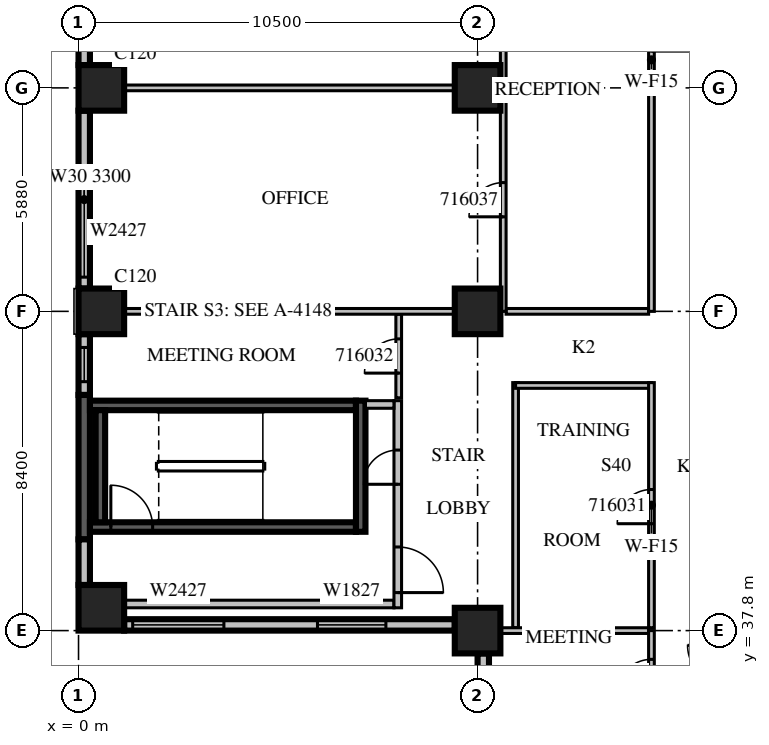
"""IFC4 building model, lengths in metres.
Left out: names, types, materials, properties, quantities, classifications, styles, units other than length and angle.
Written with IfcOpenShell. Run it as: python <this file> out.ifc"""

import sys

from ifc_helpers import new_model, si_unit, direction, frame, frame_2d, origin, origin_2d, place, context, subcontext, project, spatial, rectangle, extrude, source, transform, mapped, element, fill, save


model = new_model("IFC4")
c1 = context("Model", 3, precision=1e-05, world=origin(), true_north=direction((0.0, 1.0)))
c2 = subcontext(c1, "Body", "Model", "MODEL_VIEW")
j1 = project(units=[si_unit("LENGTHUNIT", "METRE"), si_unit("PLANEANGLEUNIT", "RADIAN")], contexts=[c1])
p1 = place(None, origin())
s1 = spatial("IfcSite", under=j1, at=p1, CompositionType="ELEMENT")
p2 = place(p1, origin())
s2 = spatial("IfcBuilding", under=s1, at=p2, CompositionType="ELEMENT")
p3 = place(p2, frame((0.0, 0.0, 78.3)))
s3 = spatial("IfcBuildingStorey", under=s2, at=p3, CompositionType="ELEMENT", Elevation=78.3)
m1 = source(origin(), c2, "Body", "SweptSolid", [
    extrude(rectangle(XDim=1.2, YDim=1.2, at=origin_2d()), origin(), (0.0, 0.0, 1.0), 4.2),
])
for number, where, z_axis, x_axis in (
    (1, (0.6, 38.4, 0.0), (0.0, 0.0, 1.0), (1.0, 0.0, 0.0)),
    (2, (10.5, 37.8, 0.0), (0.0, 0.0, 1.0), (1.0, 0.0, 0.0)),
    (3, (0.6, 46.2, 0.0), (0.0, 0.0, 1.0), (1.0, 0.0, 0.0)),
    (4, (10.5, 46.2, 0.0), (0.0, 0.0, 1.0), (1.0, 0.0, 0.0)),
    (5, (0.6, 52.08, 0.0), (0.0, 0.0, 1.0), (1.0, 0.0, 0.0)),
    (6, (10.5, 52.08, 0.0), (0.0, 0.0, 1.0), (1.0, 0.0, 0.0)),
):
    element("IfcColumn", number, at=place(p3, frame(where, z_axis=z_axis, x_axis=x_axis)), inside=s3, PredefinedType="COLUMN", context=c2, shape_type="MappedRepresentation", body=[
        mapped(m1, transform((0.0, 0.0, 0.0), scale=1.0)),
    ])
m2 = source(origin(), c2, "Body", "SweptSolid", [
    extrude(rectangle(XDim=0.88, YDim=0.3, at=frame_2d((0.44, 0.0))), origin(), (0.0, 0.0, 1.0), 3.8),
])
p4 = place(p3, frame((0.15, 53.56, 0.0), z_axis=(0.0, 0.0, 1.0), x_axis=(0.0, -1.0, 0.0)))
e7 = element("IfcWall", 7, at=p4, inside=s3, PredefinedType="STANDARD", context=c2, shape_type="MappedRepresentation", body=[
    mapped(m2, transform((0.0, 0.0, 0.0), scale=1.0)),
])
m3 = source(origin(), c2, "Body", "SweptSolid", [
    extrude(rectangle(XDim=4.68, YDim=0.3, at=frame_2d((2.34, 0.0))), origin(), (0.0, 0.0, 1.0), 3.3),
])
p5 = place(p3, frame((0.15, 51.48, 0.0), z_axis=(0.0, 0.0, 1.0), x_axis=(0.0, -1.0, 0.0)))
e8 = element("IfcWall", 8, at=p5, inside=s3, PredefinedType="STANDARD", context=c2, shape_type="MappedRepresentation", body=[
    mapped(m3, transform((0.0, 0.0, 0.0), scale=1.0)),
])
m4 = source(origin(), c2, "Body", "SweptSolid", [
    extrude(rectangle(XDim=2.4, YDim=2.7, at=frame_2d((1.2, 1.35))), frame((0.0, 0.16, 0.0), z_axis=(0.0, -1.0, 0.0), x_axis=(1.0, 0.0, 0.0)), (0.0, 0.0, 1.0), 0.32),
])
p6 = place(p5, frame((1.98, 0.0, 0.6)))
e9 = element("IfcOpeningElement", 9, at=p6, cuts=e8, PredefinedType="OPENING", context=c2, shape_type="MappedRepresentation", body=[
    mapped(m4, transform((0.0, 0.0, 0.0), scale=1.0)),
])
m5 = source(origin(), c2, "Body", "SweptSolid", [
    extrude(rectangle(XDim=1.6, YDim=0.3, at=frame_2d((0.8, 0.0))), origin(), (0.0, 0.0, 1.0), 3.8),
])
p7 = place(p3, frame((0.15, 45.6, 0.0), z_axis=(0.0, 0.0, 1.0), x_axis=(0.0, -1.0, 0.0)))
e10 = element("IfcWall", 10, at=p7, inside=s3, PredefinedType="STANDARD", context=c2, shape_type="MappedRepresentation", body=[
    mapped(m5, transform((0.0, 0.0, 0.0), scale=1.0)),
])
m6 = source(origin(), c2, "Body", "SweptSolid", [
    extrude(rectangle(XDim=0.9, YDim=2.7, at=frame_2d((0.45, 1.35))), frame((0.0, 0.16, 0.0), z_axis=(0.0, -1.0, 0.0), x_axis=(1.0, 0.0, 0.0)), (0.0, 0.0, 1.0), 0.32),
])
p8 = place(p7, frame((0.35, 0.0, 0.6)))
e11 = element("IfcOpeningElement", 11, at=p8, cuts=e10, PredefinedType="OPENING", context=c2, shape_type="MappedRepresentation", body=[
    mapped(m6, transform((0.0, 0.0, 0.0), scale=1.0)),
])
m7 = source(origin(), c2, "Body", "SweptSolid", [
    extrude(rectangle(XDim=3.8, YDim=0.3, at=frame_2d((1.9, 0.0))), origin(), (0.0, 0.0, 1.0), 3.8),
])
p9 = place(p3, frame((0.15, 44.0, 0.0), z_axis=(0.0, 0.0, 1.0), x_axis=(0.0, -1.0, 0.0)))
e12 = element("IfcWall", 12, at=p9, inside=s3, PredefinedType="SOLIDWALL", context=c2, shape_type="MappedRepresentation", body=[
    mapped(m7, transform((0.0, 0.0, 0.0), scale=1.0)),
])
m8 = source(origin(), c2, "Body", "SweptSolid", [
    extrude(rectangle(XDim=1.2, YDim=0.3, at=frame_2d((0.6, 0.0))), origin(), (0.0, 0.0, 1.0), 3.8),
])
p10 = place(p3, frame((0.15, 40.2, 0.0), z_axis=(0.0, 0.0, 1.0), x_axis=(0.0, -1.0, 0.0)))
e13 = element("IfcWall", 13, at=p10, inside=s3, PredefinedType="STANDARD", context=c2, shape_type="MappedRepresentation", body=[
    mapped(m8, transform((0.0, 0.0, 0.0), scale=1.0)),
])
m9 = source(origin(), c2, "Body", "SweptSolid", [
    extrude(rectangle(XDim=8.7, YDim=0.3, at=frame_2d((4.35, 0.0))), origin(), (0.0, 0.0, 1.0), 3.8),
])
p11 = place(p3, frame((1.2, 37.95, 0.0), z_axis=(0.0, 0.0, 1.0), x_axis=(1.0, 0.0, 0.0)))
e14 = element("IfcWall", 14, at=p11, inside=s3, PredefinedType="STANDARD", context=c2, shape_type="MappedRepresentation", body=[
    mapped(m9, transform((0.0, 0.0, 0.0), scale=1.0)),
])
p12 = place(p11, frame((0.225, 0.0, 0.6)))
e15 = element("IfcOpeningElement", 15, at=p12, cuts=e14, PredefinedType="OPENING", context=c2, shape_type="MappedRepresentation", body=[
    mapped(m4, transform((0.0, 0.0, 0.0), scale=1.0)),
])
m10 = source(origin(), c2, "Body", "SweptSolid", [
    extrude(rectangle(XDim=1.8, YDim=2.7, at=frame_2d((0.9, 1.35))), frame((0.0, 0.16, 0.0), z_axis=(0.0, -1.0, 0.0), x_axis=(1.0, 0.0, 0.0)), (0.0, 0.0, 1.0), 0.32),
])
p13 = place(p11, frame((5.088, 0.0, 0.6)))
e16 = element("IfcOpeningElement", 16, at=p13, cuts=e14, PredefinedType="OPENING", context=c2, shape_type="MappedRepresentation", body=[
    mapped(m10, transform((0.0, 0.0, 0.0), scale=1.0)),
])
m11 = source(origin(), c2, "Body", "SweptSolid", [
    extrude(rectangle(XDim=7.2, YDim=0.3, at=frame_2d((3.6, 0.0))), origin(), (0.0, 0.0, 1.0), 3.8),
])
p14 = place(p3, frame((10.65, 37.2, 0.0), z_axis=(0.0, 0.0, 1.0), x_axis=(0.0, -1.0, 0.0)))
e17 = element("IfcWall", 17, at=p14, inside=s3, PredefinedType="STANDARD", context=c2, shape_type="MappedRepresentation", body=[
    mapped(m11, transform((0.0, 0.0, 0.0), scale=1.0)),
])
m12 = source(origin(), c2, "Body", "SweptSolid", [
    extrude(rectangle(XDim=1.2, YDim=2.7, at=frame_2d((0.6, 1.35))), frame((0.0, 0.16, 0.0), z_axis=(0.0, -1.0, 0.0), x_axis=(1.0, 0.0, 0.0)), (0.0, 0.0, 1.0), 0.32),
])
p15 = place(p14, frame((4.942, 0.0, 0.6)))
e18 = element("IfcOpeningElement", 18, at=p15, cuts=e17, PredefinedType="OPENING", context=c2, shape_type="MappedRepresentation", body=[
    mapped(m12, transform((0.0, 0.0, 0.0), scale=1.0)),
])
p16 = place(p14, frame((2.229, 0.0, 0.6)))
e19 = element("IfcOpeningElement", 19, at=p16, cuts=e17, PredefinedType="OPENING", context=c2, shape_type="MappedRepresentation", body=[
    mapped(m12, transform((0.0, 0.0, 0.0), scale=1.0)),
])
m13 = source(origin(), c2, "Body", "SweptSolid", [
    extrude(rectangle(XDim=7.0, YDim=0.25, at=frame_2d((3.5, 0.0))), origin(), (0.0, 0.0, 1.0), 3.8),
])
p17 = place(p3, frame((0.3, 40.525, 0.0), z_axis=(0.0, 0.0, 1.0), x_axis=(1.0, 0.0, 0.0)))
e20 = element("IfcWall", 20, at=p17, inside=s3, PredefinedType="SOLIDWALL", context=c2, shape_type="MappedRepresentation", body=[
    mapped(m13, transform((0.0, 0.0, 0.0), scale=1.0)),
])
m14 = source(origin(), c2, "Body", "SweptSolid", [
    extrude(rectangle(XDim=1.1, YDim=2.1, at=frame_2d((0.55, 1.05))), frame((0.0, 0.135, 0.0), z_axis=(0.0, -1.0, 0.0), x_axis=(1.0, 0.0, 0.0)), (0.0, 0.0, 1.0), 0.27),
])
p18 = place(p17, frame((0.55, 0.0, 0.0)))
e21 = element("IfcOpeningElement", 21, at=p18, cuts=e20, PredefinedType="OPENING", context=c2, shape_type="MappedRepresentation", body=[
    mapped(m14, transform((0.0, 0.0, 0.0), scale=1.0)),
])
p19 = place(p3, frame((0.3, 43.725, 0.0), z_axis=(0.0, 0.0, 1.0), x_axis=(1.0, 0.0, 0.0)))
e22 = element("IfcWall", 22, at=p19, inside=s3, PredefinedType="SOLIDWALL", context=c2, shape_type="MappedRepresentation", body=[
    mapped(m13, transform((0.0, 0.0, 0.0), scale=1.0)),
])
m15 = source(origin(), c2, "Body", "SweptSolid", [
    extrude(rectangle(XDim=3.45, YDim=0.25, at=frame_2d((1.725, 0.0))), origin(), (0.0, 0.0, 1.0), 3.8),
])
p20 = place(p3, frame((7.425, 40.4, 0.0), z_axis=(0.0, 0.0, 1.0), x_axis=(0.0, 1.0, 0.0)))
e23 = element("IfcWall", 23, at=p20, inside=s3, PredefinedType="SOLIDWALL", context=c2, shape_type="MappedRepresentation", body=[
    mapped(m15, transform((0.0, 0.0, 0.0), scale=1.0)),
])
m16 = source(origin(), c2, "Body", "SweptSolid", [
    extrude(rectangle(XDim=2.95, YDim=0.25, at=frame_2d((1.475, 0.0))), origin(), (0.0, 0.0, 1.0), 3.8),
])
p21 = place(p3, frame((0.575, 40.65, 0.0), z_axis=(0.0, 0.0, 1.0), x_axis=(0.0, 1.0, 0.0)))
e24 = element("IfcWall", 24, at=p21, inside=s3, PredefinedType="SOLIDWALL", context=c2, shape_type="MappedRepresentation", body=[
    mapped(m16, transform((0.0, 0.0, 0.0), scale=1.0)),
])
m17 = source(origin(), c2, "Body", "SweptSolid", [
    extrude(rectangle(XDim=8.0, YDim=0.2, at=frame_2d((4.0, 0.0))), origin(), (0.0, 0.0, 1.0), 3.8),
])
p22 = place(p3, frame((0.3, 38.5, 0.0), z_axis=(0.0, 0.0, 1.0), x_axis=(1.0, 0.0, 0.0)))
e25 = element("IfcWall", 25, at=p22, inside=s3, PredefinedType="PARTITIONING", context=c2, shape_type="MappedRepresentation", body=[
    mapped(m17, transform((0.0, 0.0, 0.0), scale=1.0)),
])
m18 = source(origin(), c2, "Body", "SweptSolid", [
    extrude(rectangle(XDim=5.45, YDim=0.2, at=frame_2d((2.725, 0.0))), origin(), (0.0, 0.0, 1.0), 3.8),
])
p23 = place(p3, frame((8.4, 38.4, 0.0), z_axis=(0.0, 0.0, 1.0), x_axis=(0.0, 1.0, 0.0)))
e26 = element("IfcWall", 26, at=p23, inside=s3, PredefinedType="PARTITIONING", context=c2, shape_type="MappedRepresentation", body=[
    mapped(m18, transform((0.0, 0.0, 0.0), scale=1.0)),
])
m19 = source(origin(), c2, "Body", "SweptSolid", [
    extrude(rectangle(XDim=1.2, YDim=2.1, at=frame_2d((0.6, 1.05))), frame((0.0, 0.11, 0.0), z_axis=(0.0, -1.0, 0.0), x_axis=(1.0, 0.0, 0.0)), (0.0, 0.0, 1.0), 0.22),
])
p24 = place(p23, frame((0.4, 0.0, 0.0)))
e27 = element("IfcOpeningElement", 27, at=p24, cuts=e26, PredefinedType="OPENING", context=c2, shape_type="MappedRepresentation", body=[
    mapped(m19, transform((0.0, 0.0, 0.0), scale=1.0)),
])
m20 = source(origin(), c2, "Body", "SweptSolid", [
    extrude(rectangle(XDim=0.9, YDim=2.1, at=frame_2d((0.45, 1.05))), frame((0.0, 0.11, 0.0), z_axis=(0.0, -1.0, 0.0), x_axis=(1.0, 0.0, 0.0)), (0.0, 0.0, 1.0), 0.22),
])
p25 = place(p23, frame((3.25, 0.0, 0.0)))
e28 = element("IfcOpeningElement", 28, at=p25, cuts=e26, PredefinedType="OPENING", context=c2, shape_type="MappedRepresentation", body=[
    mapped(m20, transform((0.0, 0.0, 0.0), scale=1.0)),
])
m21 = source(origin(), c2, "Body", "SweptSolid", [
    extrude(rectangle(XDim=0.75, YDim=0.2, at=frame_2d((0.375, 0.0))), origin(), (0.0, 0.0, 1.0), 3.8),
])
p26 = place(p3, frame((7.55, 43.75, 0.0), z_axis=(0.0, 0.0, 1.0), x_axis=(1.0, 0.0, 0.0)))
e29 = element("IfcWall", 29, at=p26, inside=s3, PredefinedType="PARTITIONING", context=c2, shape_type="MappedRepresentation", body=[
    mapped(m21, transform((0.0, 0.0, 0.0), scale=1.0)),
])
m22 = source(origin(), c2, "Body", "SweptSolid", [
    extrude(rectangle(XDim=6.45, YDim=0.15, at=frame_2d((3.225, 0.0))), origin(), (0.0, 0.0, 1.0), 3.8),
])
p27 = place(p3, frame((11.5, 44.325, 0.0), z_axis=(0.0, 0.0, 1.0), x_axis=(0.0, -1.0, 0.0)))
e30 = element("IfcWall", 30, at=p27, inside=s3, PredefinedType="PARTITIONING", context=c2, shape_type="MappedRepresentation", body=[
    mapped(m22, transform((0.0, 0.0, 0.0), scale=1.0)),
])
m23 = source(origin(), c2, "Body", "SweptSolid", [
    extrude(rectangle(XDim=3.575, YDim=0.15, at=frame_2d((1.788, 0.0))), origin(), (0.0, 0.0, 1.0), 3.8),
])
p28 = place(p3, frame((15.075, 44.25, 0.0), z_axis=(0.0, 0.0, 1.0), x_axis=(-1.0, 0.0, 0.0)))
e31 = element("IfcWall", 31, at=p28, inside=s3, PredefinedType="PARTITIONING", context=c2, shape_type="MappedRepresentation", body=[
    mapped(m23, transform((0.0, 0.0, 0.0), scale=1.0)),
])
p29 = place(p3, frame((15.075, 37.875, 0.0), z_axis=(0.0, 0.0, 1.0), x_axis=(0.0, 1.0, 0.0)))
e32 = element("IfcWall", 32, at=p29, inside=s3, PredefinedType="PARTITIONING", context=c2, shape_type="MappedRepresentation", body=[
    mapped(m22, transform((0.0, 0.0, 0.0), scale=1.0)),
])
m24 = source(origin(), c2, "Body", "SweptSolid", [
    extrude(rectangle(XDim=0.9, YDim=2.1, at=frame_2d((0.45, 1.05))), frame((0.0, 0.085, 0.0), z_axis=(0.0, -1.0, 0.0), x_axis=(1.0, 0.0, 0.0)), (0.0, 0.0, 1.0), 0.17),
])
p30 = place(p29, frame((2.737, 0.0, 0.0)))
e33 = element("IfcOpeningElement", 33, at=p30, cuts=e32, PredefinedType="OPENING", context=c2, shape_type="MappedRepresentation", body=[
    mapped(m24, transform((0.0, 0.0, 0.0), scale=1.0)),
])
m25 = source(origin(), c2, "Body", "SweptSolid", [
    extrude(rectangle(XDim=2.2, YDim=0.15, at=frame_2d((1.1, 0.0))), origin(), (0.0, 0.0, 1.0), 3.8),
])
p31 = place(p3, frame((8.425, 43.925, 0.0), z_axis=(0.0, 0.0, 1.0), x_axis=(0.0, 1.0, 0.0)))
e34 = element("IfcWall", 34, at=p31, inside=s3, PredefinedType="PARTITIONING", context=c2, shape_type="MappedRepresentation", body=[
    mapped(m25, transform((0.0, 0.0, 0.0), scale=1.0)),
])
p32 = place(p31, frame((0.65, 0.0, 0.0)))
e35 = element("IfcOpeningElement", 35, at=p32, cuts=e34, PredefinedType="OPENING", context=c2, shape_type="MappedRepresentation", body=[
    mapped(m24, transform((0.0, 0.0, 0.0), scale=1.0)),
])
m26 = source(origin(), c2, "Body", "SweptSolid", [
    extrude(rectangle(XDim=3.901, YDim=0.15, at=frame_2d((1.95, 0.0))), origin(), (0.0, 0.0, 1.0), 3.8),
])
p33 = place(p3, frame((15.0, 37.8, 0.0), z_axis=(0.0, 0.0, 1.0), x_axis=(-1.0, 0.0, 0.0)))
e36 = element("IfcWall", 36, at=p33, inside=s3, PredefinedType="PARTITIONING", context=c2, shape_type="MappedRepresentation", body=[
    mapped(m26, transform((0.0, 0.0, 0.0), scale=1.0)),
])
m27 = source(origin(), c2, "Body", "SweptSolid", [
    extrude(rectangle(XDim=8.702, YDim=0.15, at=frame_2d((4.351, 0.0))), origin(), (0.0, 0.0, 1.0), 3.8),
])
for number, where, z_axis, x_axis in (
    (37, (9.901, 52.08, 0.0), (0.0, 0.0, 1.0), (-1.0, 0.0, 0.0)),
    (38, (9.901, 46.2, 0.0), (0.0, 0.0, 1.0), (-1.0, 0.0, 0.0)),
):
    element("IfcWall", number, at=place(p3, frame(where, z_axis=z_axis, x_axis=x_axis)), inside=s3, PredefinedType="PARTITIONING", context=c2, shape_type="MappedRepresentation", body=[
        mapped(m27, transform((0.0, 0.0, 0.0), scale=1.0)),
    ])
m28 = source(origin(), c2, "Body", "SweptSolid", [
    extrude(rectangle(XDim=3.75, YDim=0.15, at=frame_2d((1.875, 0.0))), origin(), (0.0, 0.0, 1.0), 3.8),
])
p34 = place(p3, frame((15.0, 46.2, 0.0), z_axis=(0.0, 0.0, 1.0), x_axis=(-1.0, 0.0, 0.0)))
e39 = element("IfcWall", 39, at=p34, inside=s3, PredefinedType="PARTITIONING", context=c2, shape_type="MappedRepresentation", body=[
    mapped(m28, transform((0.0, 0.0, 0.0), scale=1.0)),
])
p35 = place(p3, frame((11.175, 46.2, 0.0), z_axis=(0.0, 0.0, 1.0), x_axis=(0.0, 1.0, 0.0)))
e40 = element("IfcWall", 40, at=p35, inside=s3, PredefinedType="PARTITIONING", context=c2, shape_type="SweptSolid", body=[
    extrude(rectangle(XDim=13.235, YDim=0.15, at=frame_2d((6.617, 0.0))), origin(), (0.0, 0.0, 1.0), 3.8),
])
p36 = place(p35, frame((2.487, 0.0, 0.0)))
e41 = element("IfcOpeningElement", 41, at=p36, cuts=e40, PredefinedType="OPENING", context=c2, shape_type="MappedRepresentation", body=[
    mapped(m24, transform((0.0, 0.0, 0.0), scale=1.0)),
])
p37 = place(p35, frame((8.053, 0.0, 0.0)))
e42 = element("IfcOpeningElement", 42, at=p37, cuts=e40, PredefinedType="OPENING", context=c2, shape_type="MappedRepresentation", body=[
    mapped(m24, transform((0.0, 0.0, 0.0), scale=1.0)),
])
m29 = source(origin(), c2, "Body", "SweptSolid", [
    extrude(rectangle(XDim=8.4, YDim=0.15, at=frame_2d((4.2, 0.0))), origin(), (0.0, 0.0, 1.0), 3.8),
])
p38 = place(p3, frame((15.075, 29.4, 0.0), z_axis=(0.0, 0.0, 1.0), x_axis=(0.0, 1.0, 0.0)))
e43 = element("IfcWall", 43, at=p38, inside=s3, PredefinedType="PARTITIONING", context=c2, shape_type="MappedRepresentation", body=[
    mapped(m29, transform((0.0, 0.0, 0.0), scale=1.0)),
])
m30 = source(origin(), c2, "Body", "SweptSolid", [
    extrude(rectangle(XDim=1.1, YDim=2.1, at=frame_2d((0.55, 1.05))), frame((0.0, 0.085, 0.0), z_axis=(0.0, -1.0, 0.0), x_axis=(1.0, 0.0, 0.0)), (0.0, 0.0, 1.0), 0.17),
])
p39 = place(p38, frame((1.12, 0.0, 0.0)))
e44 = element("IfcOpeningElement", 44, at=p39, cuts=e43, PredefinedType="OPENING", context=c2, shape_type="MappedRepresentation", body=[
    mapped(m30, transform((0.0, 0.0, 0.0), scale=1.0)),
])
p40 = place(p38, frame((4.214, 0.0, 0.0)))
e45 = element("IfcOpeningElement", 45, at=p40, cuts=e43, PredefinedType="OPENING", context=c2, shape_type="MappedRepresentation", body=[
    mapped(m24, transform((0.0, 0.0, 0.0), scale=1.0)),
])
p41 = place(p38, frame((6.744, 0.0, 0.0)))
e46 = element("IfcOpeningElement", 46, at=p41, cuts=e43, PredefinedType="OPENING", context=c2, shape_type="MappedRepresentation", body=[
    mapped(m24, transform((0.0, 0.0, 0.0), scale=1.0)),
])
m31 = source(origin(), c2, "Body", "SweptSolid", [
    extrude(rectangle(XDim=13.235, YDim=0.15, at=frame_2d((6.617, 0.0))), origin(), (0.0, 0.0, 1.0), 3.8),
])
p42 = place(p3, frame((15.075, 46.2, 0.0), z_axis=(0.0, 0.0, 1.0), x_axis=(0.0, 1.0, 0.0)))
e47 = element("IfcWall", 47, at=p42, inside=s3, PredefinedType="PARTITIONING", context=c2, shape_type="MappedRepresentation", body=[
    mapped(m31, transform((0.0, 0.0, 0.0), scale=1.0)),
])
m32 = source(origin(), c2, "Body", "SweptSolid", [
    extrude(rectangle(XDim=1.2, YDim=2.1, at=frame_2d((0.6, 1.05))), frame((0.0, 0.085, 0.0), z_axis=(0.0, -1.0, 0.0), x_axis=(1.0, 0.0, 0.0)), (0.0, 0.0, 1.0), 0.17),
])
p43 = place(p42, frame((6.848, 0.0, 0.0)))
e48 = element("IfcOpeningElement", 48, at=p43, cuts=e47, PredefinedType="OPENING", context=c2, shape_type="MappedRepresentation", body=[
    mapped(m32, transform((0.0, 0.0, 0.0), scale=1.0)),
])
p44 = place(p42, frame((8.098, 0.0, 0.0)))
e49 = element("IfcOpeningElement", 49, at=p44, cuts=e47, PredefinedType="OPENING", context=c2, shape_type="MappedRepresentation", body=[
    mapped(m24, transform((0.0, 0.0, 0.0), scale=1.0)),
])
m33 = source(origin(), c2, "Body", "SweptSolid", [
    extrude(rectangle(XDim=2.4, YDim=2.7, at=frame_2d((1.2, 1.35))), frame((0.0, 0.03, 0.0), z_axis=(0.0, -1.0, 0.0), x_axis=(1.0, 0.0, 0.0)), (0.0, 0.0, 1.0), 0.06),
])
p45 = place(p6, origin())
e50 = element("IfcWindow", 50, at=p45, inside=s3, PartitioningType="SINGLE_PANEL", PredefinedType="WINDOW", context=c2, shape_type="MappedRepresentation", body=[
    mapped(m33, transform((0.0, 0.0, 0.0), scale=1.0)),
])
fill(e9, e50)
m34 = source(origin(), c2, "Body", "SweptSolid", [
    extrude(rectangle(XDim=0.9, YDim=2.7, at=frame_2d((0.45, 1.35))), frame((0.0, 0.03, 0.0), z_axis=(0.0, -1.0, 0.0), x_axis=(1.0, 0.0, 0.0)), (0.0, 0.0, 1.0), 0.06),
])
p46 = place(p8, origin())
e51 = element("IfcWindow", 51, at=p46, inside=s3, PartitioningType="SINGLE_PANEL", PredefinedType="WINDOW", context=c2, shape_type="MappedRepresentation", body=[
    mapped(m34, transform((0.0, 0.0, 0.0), scale=1.0)),
])
fill(e11, e51)
p47 = place(p12, origin())
e52 = element("IfcWindow", 52, at=p47, inside=s3, PartitioningType="SINGLE_PANEL", PredefinedType="WINDOW", context=c2, shape_type="MappedRepresentation", body=[
    mapped(m33, transform((0.0, 0.0, 0.0), scale=1.0)),
])
fill(e15, e52)
m35 = source(origin(), c2, "Body", "SweptSolid", [
    extrude(rectangle(XDim=1.8, YDim=2.7, at=frame_2d((0.9, 1.35))), frame((0.0, 0.03, 0.0), z_axis=(0.0, -1.0, 0.0), x_axis=(1.0, 0.0, 0.0)), (0.0, 0.0, 1.0), 0.06),
])
p48 = place(p13, origin())
e53 = element("IfcWindow", 53, at=p48, inside=s3, PartitioningType="SINGLE_PANEL", PredefinedType="WINDOW", context=c2, shape_type="MappedRepresentation", body=[
    mapped(m35, transform((0.0, 0.0, 0.0), scale=1.0)),
])
fill(e16, e53)
m36 = source(origin(), c2, "Body", "SweptSolid", [
    extrude(rectangle(XDim=1.1, YDim=2.1, at=frame_2d((0.55, 1.05))), frame((0.0, 0.025, 0.0), z_axis=(0.0, -1.0, 0.0), x_axis=(1.0, 0.0, 0.0)), (0.0, 0.0, 1.0), 0.05),
])
p49 = place(p18, origin())
e54 = element("IfcDoor", 54, at=p49, inside=s3, OperationType="SINGLE_SWING_LEFT", PredefinedType="DOOR", context=c2, shape_type="MappedRepresentation", body=[
    mapped(m36, transform((0.0, 0.0, 0.0), scale=1.0)),
])
fill(e21, e54)
m37 = source(origin(), c2, "Body", "SweptSolid", [
    extrude(rectangle(XDim=1.2, YDim=2.1, at=frame_2d((0.6, 1.05))), frame((0.0, 0.025, 0.0), z_axis=(0.0, -1.0, 0.0), x_axis=(1.0, 0.0, 0.0)), (0.0, 0.0, 1.0), 0.05),
])
p50 = place(p24, origin())
e55 = element("IfcDoor", 55, at=p50, inside=s3, OperationType="SINGLE_SWING_RIGHT", PredefinedType="DOOR", context=c2, shape_type="MappedRepresentation", body=[
    mapped(m37, transform((0.0, 0.0, 0.0), scale=1.0)),
])
fill(e27, e55)
m38 = source(origin(), c2, "Body", "SweptSolid", [
    extrude(rectangle(XDim=0.9, YDim=2.1, at=frame_2d((0.45, 1.05))), frame((0.0, 0.025, 0.0), z_axis=(0.0, -1.0, 0.0), x_axis=(1.0, 0.0, 0.0)), (0.0, 0.0, 1.0), 0.05),
])
p51 = place(p25, origin())
e56 = element("IfcDoor", 56, at=p51, inside=s3, OperationType="SINGLE_SWING_LEFT", PredefinedType="DOOR", context=c2, shape_type="MappedRepresentation", body=[
    mapped(m38, transform((0.0, 0.0, 0.0), scale=1.0)),
])
fill(e28, e56)
p52 = place(p30, origin())
e57 = element("IfcDoor", 57, at=p52, inside=s3, OperationType="SINGLE_SWING_LEFT", PredefinedType="DOOR", context=c2, shape_type="MappedRepresentation", body=[
    mapped(m38, transform((0.0, 0.0, 0.0), scale=1.0)),
])
fill(e33, e57)
p53 = place(p32, origin())
e58 = element("IfcDoor", 58, at=p53, inside=s3, OperationType="SINGLE_SWING_LEFT", PredefinedType="DOOR", context=c2, shape_type="MappedRepresentation", body=[
    mapped(m38, transform((0.0, 0.0, 0.0), scale=1.0)),
])
fill(e35, e58)
p54 = place(p41, origin())
e59 = element("IfcDoor", 59, at=p54, inside=s3, OperationType="SINGLE_SWING_LEFT", PredefinedType="DOOR", context=c2, shape_type="MappedRepresentation", body=[
    mapped(m38, transform((0.0, 0.0, 0.0), scale=1.0)),
])
fill(e46, e59)
p55 = place(p36, origin())
e60 = element("IfcDoor", 60, at=p55, inside=s3, OperationType="SINGLE_SWING_LEFT", PredefinedType="DOOR", context=c2, shape_type="MappedRepresentation", body=[
    mapped(m38, transform((0.0, 0.0, 0.0), scale=1.0)),
])
fill(e41, e60)
save(model, sys.argv[1])
